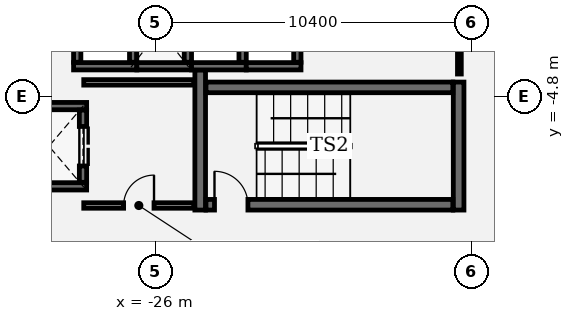
"""IFC4 building model, lengths in metres.
Left out: names, types, materials, properties, quantities, classifications, styles, units other than length and angle.
Written with IfcOpenShell. Run it as: python <this file> out.ifc"""

import sys

from ifc_helpers import new_model, si_unit, direction, frame, frame_2d, origin, place, context, subcontext, project, spatial, rectangle, extrude, element, fill, save


model = new_model("IFC4")
c1 = context("Model", 3, precision=1e-05, world=origin(), true_north=direction((0.0, 1.0)))
c2 = subcontext(c1, "Body", "Model", "MODEL_VIEW")
j1 = project(units=[si_unit("LENGTHUNIT", "METRE"), si_unit("PLANEANGLEUNIT", "RADIAN")], contexts=[c1])
p1 = place(None, origin())
s1 = spatial("IfcSite", under=j1, at=p1, CompositionType="ELEMENT")
p2 = place(p1, origin())
s2 = spatial("IfcBuilding", under=s1, at=p2, CompositionType="ELEMENT")
p3 = place(p2, frame((0.0, 0.0, 259.8)))
s3 = spatial("IfcBuildingStorey", under=s2, at=p3, CompositionType="ELEMENT", Elevation=259.8)
p4 = place(p3, frame((-24.525, -3.94, 0.0), z_axis=(0.0, 0.0, 1.0), x_axis=(0.0, -1.0, 0.0)))
e1 = element("IfcWall", 1, at=p4, inside=s3, PredefinedType="SHEAR", context=c2, shape_type="SweptSolid", body=[
    extrude(rectangle(XDim=4.61, YDim=0.35, at=frame_2d((2.305, 0.0))), origin(), (0.0, 0.0, 1.0), 3.91),
])
p5 = place(p3, frame((-16.025, -8.55, 0.0), z_axis=(0.0, 0.0, 1.0), x_axis=(0.0, 1.0, 0.0)))
e2 = element("IfcWall", 2, at=p5, inside=s3, PredefinedType="SHEAR", context=c2, shape_type="SweptSolid", body=[
    extrude(rectangle(XDim=4.21, YDim=0.35, at=frame_2d((2.105, 0.0))), origin(), (0.0, 0.0, 1.0), 3.91),
])
p6 = place(p3, frame((-24.335, -8.375, 0.0), z_axis=(0.0, 0.0, 1.0), x_axis=(1.0, 0.0, 0.0)))
e3 = element("IfcWall", 3, at=p6, inside=s3, PredefinedType="SHEAR", context=c2, shape_type="SweptSolid", body=[
    extrude(rectangle(XDim=8.12, YDim=0.35, at=frame_2d((4.06, 0.0))), origin(), (0.0, 0.0, 1.0), 3.91),
])
p7 = place(p6, frame((0.28, 0.0, 0.0)))
e4 = element("IfcOpeningElement", 4, at=p7, cuts=e3, PredefinedType="OPENING", context=c2, shape_type="SweptSolid", body=[
    extrude(rectangle(XDim=1.1, YDim=2.2, at=frame_2d((0.55, 1.1))), frame((0.0, 0.185, 0.0), z_axis=(0.0, -1.0, 0.0), x_axis=(1.0, 0.0, 0.0)), (0.0, 0.0, 1.0), 0.37),
])
p8 = place(p3, frame((-16.215, -4.515, 0.0), z_axis=(0.0, 0.0, 1.0), x_axis=(-1.0, 0.0, 0.0)))
e5 = element("IfcWall", 5, at=p8, inside=s3, PredefinedType="SHEAR", context=c2, shape_type="SweptSolid", body=[
    extrude(rectangle(XDim=8.12, YDim=0.35, at=frame_2d((4.06, 0.0))), origin(), (0.0, 0.0, 1.0), 3.91),
])
for number, where, z_axis, x_axis in (
    (6, (-28.26, -7.77, 0.0), (0.0, 0.0, 1.0), (-1.0, 0.0, 0.0)),
    (7, (-30.74, -5.13, 0.0), (0.0, 0.0, 1.0), (1.0, 0.0, 0.0)),
):
    element("IfcWall", number, at=place(p3, frame(where, z_axis=z_axis, x_axis=x_axis)), inside=s3, PredefinedType="SHEAR", context=c2, shape_type="SweptSolid", body=[
        extrude(rectangle(XDim=2.48, YDim=0.24, at=frame_2d((1.24, 0.0))), origin(), (0.0, 0.0, 1.0), 3.91),
    ])
p9 = place(p3, frame((-28.38, -5.262, 0.0), z_axis=(0.0, 0.0, 1.0), x_axis=(0.0, -1.0, 0.0)))
e8 = element("IfcWall", 8, at=p9, inside=s3, PredefinedType="SHEAR", context=c2, shape_type="SweptSolid", body=[
    extrude(rectangle(XDim=2.376, YDim=0.24, at=frame_2d((1.188, 0.0))), origin(), (0.0, 0.0, 1.0), 3.91),
])
p10 = place(p9, frame((0.538, 0.0, 0.0)))
e9 = element("IfcOpeningElement", 9, at=p10, cuts=e8, PredefinedType="OPENING", context=c2, shape_type="SweptSolid", body=[
    extrude(rectangle(XDim=1.3, YDim=2.3, at=frame_2d((0.65, 1.15))), frame((0.0, 0.13, 0.0), z_axis=(0.0, -1.0, 0.0), x_axis=(1.0, 0.0, 0.0)), (0.0, 0.0, 1.0), 0.26),
])
p11 = place(p3, frame((-26.61, -3.82, 0.0), z_axis=(0.0, 0.0, 1.0), x_axis=(-1.0, 0.0, 0.0)))
e10 = element("IfcWall", 10, at=p11, inside=s3, PredefinedType="SHEAR", context=c2, shape_type="SweptSolid", body=[
    extrude(rectangle(XDim=2.08, YDim=0.24, at=frame_2d((1.04, 0.0))), origin(), (0.0, 0.0, 1.0), 3.91),
])
for number, where, z_axis, x_axis in (
    (11, (-28.57, -3.688, 0.0), (0.0, 0.0, 1.0), (0.0, 1.0, 0.0)),
    (12, (-26.73, -1.562, 0.0), (0.0, 0.0, 1.0), (0.0, -1.0, 0.0)),
):
    element("IfcWall", number, at=place(p3, frame(where, z_axis=z_axis, x_axis=x_axis)), inside=s3, PredefinedType="SHEAR", context=c2, shape_type="SweptSolid", body=[
        extrude(rectangle(XDim=2.126, YDim=0.24, at=frame_2d((1.063, 0.0))), origin(), (0.0, 0.0, 1.0), 3.91),
    ])
p12 = place(p3, frame((-24.81, -3.82, 0.0), z_axis=(0.0, 0.0, 1.0), x_axis=(-1.0, 0.0, 0.0)))
e13 = element("IfcWall", 13, at=p12, inside=s3, PredefinedType="SHEAR", context=c2, shape_type="SweptSolid", body=[
    extrude(rectangle(XDim=1.8, YDim=0.24, at=frame_2d((0.9, 0.0))), origin(), (0.0, 0.0, 1.0), 3.91),
])
p13 = place(p3, frame((-24.93, -1.562, 0.0), z_axis=(0.0, 0.0, 1.0), x_axis=(0.0, -1.0, 0.0)))
e14 = element("IfcWall", 14, at=p13, inside=s3, PredefinedType="SHEAR", context=c2, shape_type="SweptSolid", body=[
    extrude(rectangle(XDim=2.126, YDim=0.24, at=frame_2d((1.063, 0.0))), origin(), (0.0, 0.0, 1.0), 3.91),
])
p14 = place(p3, frame((-23.01, -3.82, 0.0), z_axis=(0.0, 0.0, 1.0), x_axis=(-1.0, 0.0, 0.0)))
e15 = element("IfcWall", 15, at=p14, inside=s3, PredefinedType="SHEAR", context=c2, shape_type="SweptSolid", body=[
    extrude(rectangle(XDim=1.8, YDim=0.24, at=frame_2d((0.9, 0.0))), origin(), (0.0, 0.0, 1.0), 3.91),
])
p15 = place(p3, frame((-23.13, -1.562, 0.0), z_axis=(0.0, 0.0, 1.0), x_axis=(0.0, -1.0, 0.0)))
e16 = element("IfcWall", 16, at=p15, inside=s3, PredefinedType="SHEAR", context=c2, shape_type="SweptSolid", body=[
    extrude(rectangle(XDim=2.126, YDim=0.24, at=frame_2d((1.063, 0.0))), origin(), (0.0, 0.0, 1.0), 3.91),
])
p16 = place(p3, frame((-21.21, -3.82, 0.0), z_axis=(0.0, 0.0, 1.0), x_axis=(-1.0, 0.0, 0.0)))
e17 = element("IfcWall", 17, at=p16, inside=s3, PredefinedType="SHEAR", context=c2, shape_type="SweptSolid", body=[
    extrude(rectangle(XDim=1.8, YDim=0.24, at=frame_2d((0.9, 0.0))), origin(), (0.0, 0.0, 1.0), 3.91),
])
p17 = place(p3, frame((-21.33, -1.562, 0.0), z_axis=(0.0, 0.0, 1.0), x_axis=(0.0, -1.0, 0.0)))
e18 = element("IfcWall", 18, at=p17, inside=s3, PredefinedType="SHEAR", context=c2, shape_type="SweptSolid", body=[
    extrude(rectangle(XDim=2.126, YDim=0.24, at=frame_2d((1.063, 0.0))), origin(), (0.0, 0.0, 1.0), 3.91),
])
p18 = place(p3, frame((-28.355, -8.4, 0.0), z_axis=(0.0, 0.0, 1.0), x_axis=(1.0, 0.0, 0.0)))
e19 = element("IfcWall", 19, at=p18, inside=s3, PredefinedType="PARTITIONING", context=c2, shape_type="SweptSolid", body=[
    extrude(rectangle(XDim=3.622, YDim=0.18, at=frame_2d((1.811, 0.0))), origin(), (0.0, 0.0, 1.0), 3.529),
])
p19 = place(p18, frame((1.311, 0.0, 0.0)))
e20 = element("IfcOpeningElement", 20, at=p19, cuts=e19, PredefinedType="OPENING", context=c2, shape_type="SweptSolid", body=[
    extrude(rectangle(XDim=1.0, YDim=2.15, at=frame_2d((0.5, 1.075))), frame((0.0, 0.1, 0.0), z_axis=(0.0, -1.0, 0.0), x_axis=(1.0, 0.0, 0.0)), (0.0, 0.0, 1.0), 0.2),
])
p20 = place(p3, frame((-24.733, -4.35, 0.0), z_axis=(0.0, 0.0, 1.0), x_axis=(-1.0, 0.0, 0.0)))
e21 = element("IfcWall", 21, at=p20, inside=s3, PredefinedType="PARTITIONING", context=c2, shape_type="SweptSolid", body=[
    extrude(rectangle(XDim=3.622, YDim=0.18, at=frame_2d((1.811, 0.0))), origin(), (0.0, 0.0, 1.0), 3.91),
])
p21 = place(p3, frame((-16.0, -4.075, 0.0), z_axis=(0.0, 0.0, 1.0), x_axis=(0.0, 1.0, 0.0)))
e22 = element("IfcWall", 22, at=p21, inside=s3, PredefinedType="PARTITIONING", context=c2, shape_type="SweptSolid", body=[
    extrude(rectangle(XDim=2.49, YDim=0.125, at=frame_2d((1.245, 0.0))), origin(), (0.0, 0.0, 1.0), 3.91),
])
p22 = place(p7, origin())
e23 = element("IfcDoor", 23, at=p22, inside=s3, OperationType="SINGLE_SWING_LEFT", PredefinedType="DOOR", context=c2, shape_type="SweptSolid", body=[
    extrude(rectangle(XDim=1.1, YDim=2.2, at=frame_2d((0.55, 1.1))), frame((0.0, 0.025, 0.0), z_axis=(0.0, -1.0, 0.0), x_axis=(1.0, 0.0, 0.0)), (0.0, 0.0, 1.0), 0.05),
])
fill(e4, e23)
p23 = place(p10, origin())
e24 = element("IfcDoor", 24, at=p23, inside=s3, OperationType="DOUBLE_DOOR_SLIDING", PredefinedType="DOOR", context=c2, shape_type="SweptSolid", body=[
    extrude(rectangle(XDim=1.3, YDim=2.3, at=frame_2d((0.65, 1.15))), frame((0.0, 0.025, 0.0), z_axis=(0.0, -1.0, 0.0), x_axis=(1.0, 0.0, 0.0)), (0.0, 0.0, 1.0), 0.05),
])
fill(e9, e24)
p24 = place(p19, origin())
e25 = element("IfcDoor", 25, at=p24, inside=s3, OperationType="SINGLE_SWING_RIGHT", PredefinedType="DOOR", context=c2, shape_type="SweptSolid", body=[
    extrude(rectangle(XDim=1.0, YDim=2.15, at=frame_2d((0.5, 1.075))), frame((0.0, 0.025, 0.0), z_axis=(0.0, -1.0, 0.0), x_axis=(1.0, 0.0, 0.0)), (0.0, 0.0, 1.0), 0.05),
])
fill(e20, e25)
save(model, sys.argv[1])
